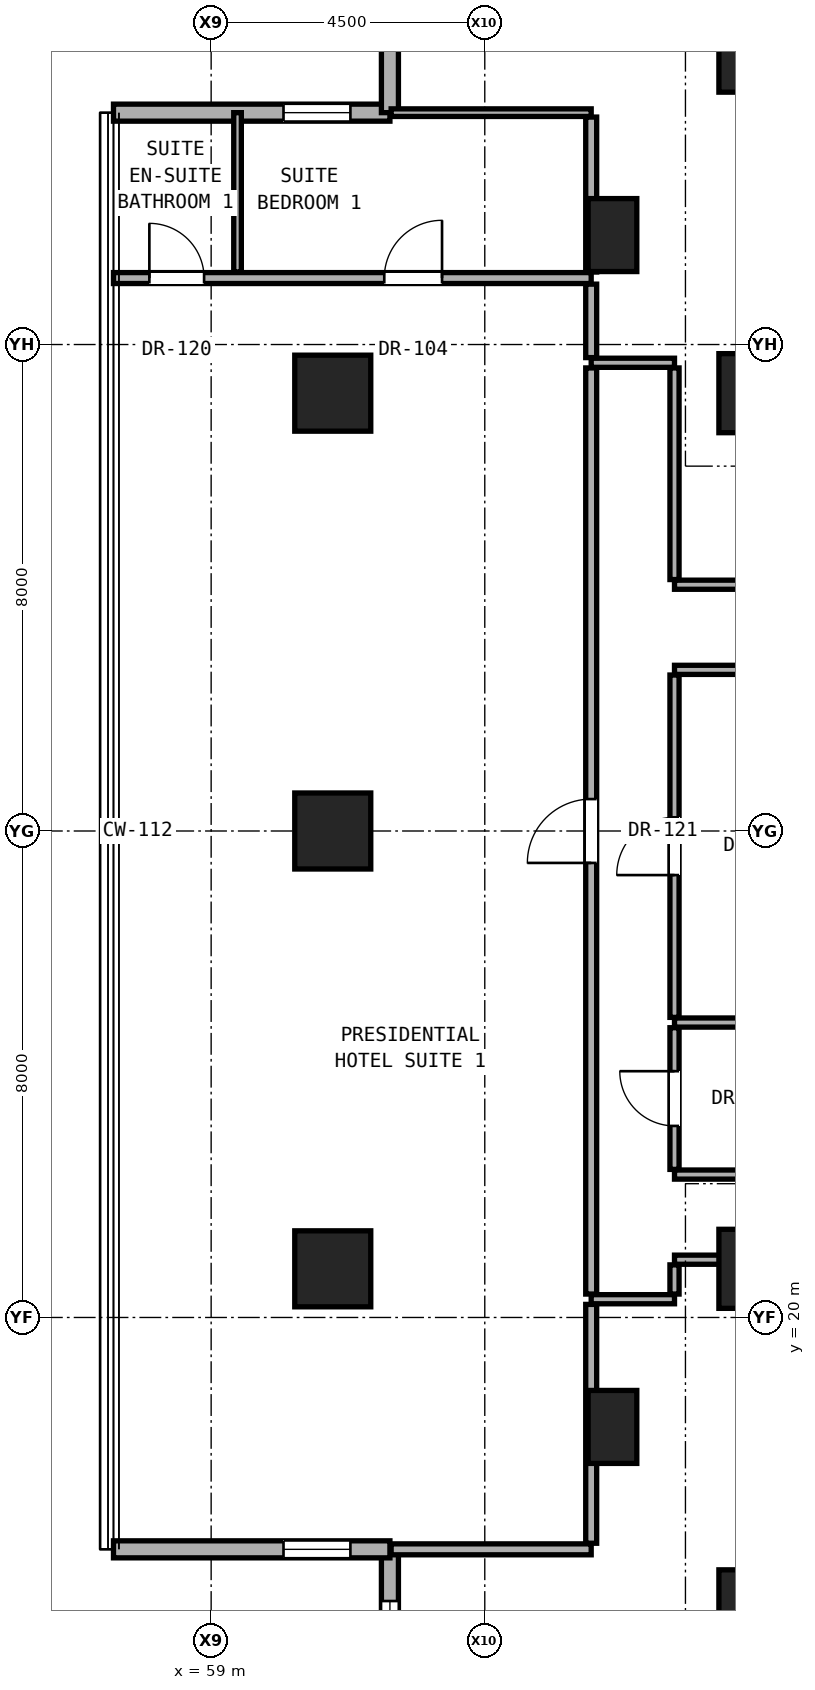
"""IFC4 building model, lengths in metres.
Left out: names, types, materials, properties, quantities, classifications, styles, units other than length and angle.
Written with IfcOpenShell. Run it as: python <this file> out.ifc"""

import sys

from ifc_helpers import new_model, si_unit, direction, frame, frame_2d, origin, origin_2d, place, context, subcontext, project, spatial, rectangle, hollow_rectangle, extrude, element, fill, save


model = new_model("IFC4")
c1 = context("Model", 3, precision=1e-05, world=origin(), true_north=direction((0.0, 1.0)))
c2 = subcontext(c1, "Body", "Model", "MODEL_VIEW")
j1 = project(units=[si_unit("LENGTHUNIT", "METRE"), si_unit("PLANEANGLEUNIT", "RADIAN")], contexts=[c1])
p1 = place(None, origin())
s1 = spatial("IfcSite", under=j1, at=p1, CompositionType="ELEMENT")
p2 = place(p1, origin())
s2 = spatial("IfcBuilding", under=s1, at=p2, CompositionType="ELEMENT")
p3 = place(p2, frame((0.0, 0.0, 75.2)))
s3 = spatial("IfcBuildingStorey", under=s2, at=p3, CompositionType="ELEMENT", Elevation=75.2)
for number, where, z_axis, x_axis in (
    (1, (68.0, 15.2, 0.0), (0.0, 0.0, 1.0), (1.0, 0.0, 0.0)),
    (2, (68.0, 20.8, 0.0), (0.0, 0.0, 1.0), (1.0, 0.0, 0.0)),
    (3, (68.0, 35.2, 0.0), (0.0, 0.0, 1.0), (1.0, 0.0, 0.0)),
    (4, (68.0, 40.8, 0.0), (0.0, 0.0, 1.0), (1.0, 0.0, 0.0)),
):
    element("IfcColumn", number, at=place(p3, frame(where, z_axis=z_axis, x_axis=x_axis)), inside=s3, PredefinedType="COLUMN", context=c2, shape_type="SweptSolid", body=[
        extrude(rectangle(XDim=1.3, YDim=1.3, at=origin_2d()), origin(), (0.0, 0.0, 1.0), 3.3),
    ])
for number, where, z_axis, x_axis in (
    (5, (61.0, 20.8, 0.0), (0.0, 0.0, 1.0), (1.0, 0.0, 0.0)),
    (6, (61.0, 28.0, 0.0), (0.0, 0.0, 1.0), (1.0, 0.0, 0.0)),
    (7, (61.0, 35.2, 0.0), (0.0, 0.0, 1.0), (1.0, 0.0, 0.0)),
):
    element("IfcColumn", number, at=place(p3, frame(where, z_axis=z_axis, x_axis=x_axis)), inside=s3, PredefinedType="COLUMN", context=c2, shape_type="SweptSolid", body=[
        extrude(hollow_rectangle(XDim=1.25, YDim=1.25, WallThickness=0.07, at=origin_2d()), origin(), (0.0, 0.0, 1.0), 3.3),
    ])
for number, where, z_axis, x_axis in (
    (8, (65.6, 18.2, 0.0), (0.0, 0.0, 1.0), (1.0, 0.0, 0.0)),
    (9, (65.6, 37.8, 0.0), (0.0, 0.0, 1.0), (1.0, 0.0, 0.0)),
):
    element("IfcColumn", number, at=place(p3, frame(where, z_axis=z_axis, x_axis=x_axis)), inside=s3, PredefinedType="PILASTER", context=c2, shape_type="SweptSolid", body=[
        extrude(rectangle(XDim=0.8, YDim=1.2, at=origin_2d()), origin(), (0.0, 0.0, 1.0), 3.3),
    ])
p4 = place(p3, frame((61.94, 16.187, 0.0), z_axis=(0.0, 0.0, 1.0), x_axis=(0.0, -1.0, 0.0)))
e10 = element("IfcWall", 10, at=p4, inside=s3, PredefinedType="SOLIDWALL", context=c2, shape_type="SweptSolid", body=[
    extrude(rectangle(XDim=4.546, YDim=0.28, at=frame_2d((2.273, 0.0))), origin(), (0.0, 0.0, 1.0), 3.04),
])
p5 = place(p4, frame((0.85, 0.0, 0.79)))
e11 = element("IfcOpeningElement", 11, at=p5, cuts=e10, PredefinedType="OPENING", context=c2, shape_type="SweptSolid", body=[
    extrude(rectangle(XDim=1.8, YDim=2.1, at=frame_2d((0.9, 1.05))), frame((0.0, 0.15, 0.0), z_axis=(0.0, -1.0, 0.0), x_axis=(1.0, 0.0, 0.0)), (0.0, 0.0, 1.0), 0.3),
])
p6 = place(p3, frame((57.394, 16.187, 0.0), z_axis=(0.0, 0.0, 1.0), x_axis=(1.0, 0.0, 0.0)))
e12 = element("IfcWall", 12, at=p6, inside=s3, PredefinedType="SOLIDWALL", context=c2, shape_type="SweptSolid", body=[
    extrude(rectangle(XDim=4.546, YDim=0.28, at=frame_2d((2.273, 0.0))), origin(), (0.0, 0.0, 1.0), 3.04),
])
p7 = place(p6, frame((2.796, 0.0, 0.85)))
e13 = element("IfcOpeningElement", 13, at=p7, cuts=e12, PredefinedType="OPENING", context=c2, shape_type="SweptSolid", body=[
    extrude(rectangle(XDim=1.1, YDim=2.0, at=frame_2d((0.55, 1.0))), frame((0.0, 0.15, 0.0), z_axis=(0.0, -1.0, 0.0), x_axis=(1.0, 0.0, 0.0)), (0.0, 0.0, 1.0), 0.3),
])
p8 = place(p3, frame((61.94, 39.813, 0.0), z_axis=(0.0, 0.0, 1.0), x_axis=(-1.0, 0.0, 0.0)))
e14 = element("IfcWall", 14, at=p8, inside=s3, PredefinedType="SOLIDWALL", context=c2, shape_type="SweptSolid", body=[
    extrude(rectangle(XDim=4.546, YDim=0.28, at=frame_2d((2.273, 0.0))), origin(), (0.0, 0.0, 1.0), 3.04),
])
p9 = place(p8, frame((0.65, 0.0, 0.85)))
e15 = element("IfcOpeningElement", 15, at=p9, cuts=e14, PredefinedType="OPENING", context=c2, shape_type="SweptSolid", body=[
    extrude(rectangle(XDim=1.1, YDim=2.0, at=frame_2d((0.55, 1.0))), frame((0.0, 0.15, 0.0), z_axis=(0.0, -1.0, 0.0), x_axis=(1.0, 0.0, 0.0)), (0.0, 0.0, 1.0), 0.3),
])
p10 = place(p3, frame((61.94, 44.359, 0.0), z_axis=(0.0, 0.0, 1.0), x_axis=(0.0, -1.0, 0.0)))
e16 = element("IfcWall", 16, at=p10, inside=s3, PredefinedType="SOLIDWALL", context=c2, shape_type="SweptSolid", body=[
    extrude(rectangle(XDim=4.546, YDim=0.28, at=frame_2d((2.273, 0.0))), origin(), (0.0, 0.0, 1.0), 3.04),
])
p11 = place(p3, frame((61.96, 16.187, 0.0), z_axis=(0.0, 0.0, 1.0), x_axis=(1.0, 0.0, 0.0)))
e17 = element("IfcWall", 17, at=p11, inside=s3, PredefinedType="PARTITIONING", context=c2, shape_type="SweptSolid", body=[
    extrude(rectangle(XDim=3.29, YDim=0.18, at=frame_2d((1.645, 0.0))), origin(), (0.0, 0.0, 1.0), 3.06),
])
p12 = place(p3, frame((65.25, 20.3, 0.0), z_axis=(0.0, 0.0, 1.0), x_axis=(1.0, 0.0, 0.0)))
e18 = element("IfcWall", 18, at=p12, inside=s3, PredefinedType="PARTITIONING", context=c2, shape_type="SweptSolid", body=[
    extrude(rectangle(XDim=1.37, YDim=0.15, at=frame_2d((0.685, 0.0))), origin(), (0.0, 0.0, 1.0), 3.06),
])
p13 = place(p3, frame((66.62, 20.95, 0.0), z_axis=(0.0, 0.0, 1.0), x_axis=(1.0, 0.0, 0.0)))
e19 = element("IfcWall", 19, at=p13, inside=s3, PredefinedType="PARTITIONING", context=c2, shape_type="SweptSolid", body=[
    extrude(rectangle(XDim=1.06, YDim=0.15, at=frame_2d((0.53, 0.0))), origin(), (0.0, 0.0, 1.0), 2.452),
])
p14 = place(p3, frame((66.62, 22.35, 0.0), z_axis=(0.0, 0.0, 1.0), x_axis=(1.0, 0.0, 0.0)))
e20 = element("IfcWall", 20, at=p14, inside=s3, PredefinedType="PARTITIONING", context=c2, shape_type="SweptSolid", body=[
    extrude(rectangle(XDim=19.63, YDim=0.15, at=frame_2d((9.815, 0.0))), origin(), (0.0, 0.0, 1.0), 2.125),
])
p15 = place(p14, frame((8.981, 0.0, 0.0)))
e21 = element("IfcOpeningElement", 21, at=p15, cuts=e20, PredefinedType="OPENING", context=c2, shape_type="SweptSolid", body=[
    extrude(rectangle(XDim=0.85, YDim=2.01, at=frame_2d((0.425, 1.005))), frame((0.0, 0.085, 0.0), z_axis=(0.0, -1.0, 0.0), x_axis=(1.0, 0.0, 0.0)), (0.0, 0.0, 1.0), 0.17),
])
p16 = place(p14, frame((16.061, 0.0, 0.0)))
e22 = element("IfcOpeningElement", 22, at=p16, cuts=e20, PredefinedType="OPENING", context=c2, shape_type="SweptSolid", body=[
    extrude(rectangle(XDim=0.85, YDim=2.01, at=frame_2d((0.425, 1.005))), frame((0.0, 0.085, 0.0), z_axis=(0.0, -1.0, 0.0), x_axis=(1.0, 0.0, 0.0)), (0.0, 0.0, 1.0), 0.17),
])
p17 = place(p3, frame((66.62, 24.85, 0.0), z_axis=(0.0, 0.0, 1.0), x_axis=(1.0, 0.0, 0.0)))
e23 = element("IfcWall", 23, at=p17, inside=s3, PredefinedType="PARTITIONING", context=c2, shape_type="SweptSolid", body=[
    extrude(rectangle(XDim=3.13, YDim=0.15, at=frame_2d((1.565, 0.0))), origin(), (0.0, 0.0, 1.0), 2.125),
])
p18 = place(p3, frame((66.62, 30.65, 0.0), z_axis=(0.0, 0.0, 1.0), x_axis=(1.0, 0.0, 0.0)))
e24 = element("IfcWall", 24, at=p18, inside=s3, PredefinedType="PARTITIONING", context=c2, shape_type="SweptSolid", body=[
    extrude(rectangle(XDim=19.63, YDim=0.15, at=frame_2d((9.815, 0.0))), origin(), (0.0, 0.0, 1.0), 2.125),
])
p19 = place(p18, frame((3.855, 0.0, 0.0)))
e25 = element("IfcOpeningElement", 25, at=p19, cuts=e24, PredefinedType="OPENING", context=c2, shape_type="SweptSolid", body=[
    extrude(rectangle(XDim=0.85, YDim=2.01, at=frame_2d((0.425, 1.005))), frame((0.0, 0.085, 0.0), z_axis=(0.0, -1.0, 0.0), x_axis=(1.0, 0.0, 0.0)), (0.0, 0.0, 1.0), 0.17),
])
p20 = place(p18, frame((8.981, 0.0, 0.0)))
e26 = element("IfcOpeningElement", 26, at=p20, cuts=e24, PredefinedType="OPENING", context=c2, shape_type="SweptSolid", body=[
    extrude(rectangle(XDim=0.85, YDim=2.01, at=frame_2d((0.425, 1.005))), frame((0.0, 0.085, 0.0), z_axis=(0.0, -1.0, 0.0), x_axis=(1.0, 0.0, 0.0)), (0.0, 0.0, 1.0), 0.17),
])
p21 = place(p18, frame((16.061, 0.0, 0.0)))
e27 = element("IfcOpeningElement", 27, at=p21, cuts=e24, PredefinedType="OPENING", context=c2, shape_type="SweptSolid", body=[
    extrude(rectangle(XDim=0.85, YDim=2.01, at=frame_2d((0.425, 1.005))), frame((0.0, 0.085, 0.0), z_axis=(0.0, -1.0, 0.0), x_axis=(1.0, 0.0, 0.0)), (0.0, 0.0, 1.0), 0.17),
])
p22 = place(p3, frame((66.62, 32.05, 0.0), z_axis=(0.0, 0.0, 1.0), x_axis=(1.0, 0.0, 0.0)))
e28 = element("IfcWall", 28, at=p22, inside=s3, PredefinedType="PARTITIONING", context=c2, shape_type="SweptSolid", body=[
    extrude(rectangle(XDim=2.18, YDim=0.15, at=frame_2d((1.09, 0.0))), origin(), (0.0, 0.0, 1.0), 2.125),
])
p23 = place(p3, frame((65.25, 35.7, 0.0), z_axis=(0.0, 0.0, 1.0), x_axis=(1.0, 0.0, 0.0)))
e29 = element("IfcWall", 29, at=p23, inside=s3, PredefinedType="PARTITIONING", context=c2, shape_type="SweptSolid", body=[
    extrude(rectangle(XDim=1.37, YDim=0.15, at=frame_2d((0.685, 0.0))), origin(), (0.0, 0.0, 1.0), 3.06),
])
p24 = place(p3, frame((57.394, 37.093, 0.0), z_axis=(0.0, 0.0, 1.0), x_axis=(1.0, 0.0, 0.0)))
e30 = element("IfcWall", 30, at=p24, inside=s3, PredefinedType="PARTITIONING", context=c2, shape_type="SweptSolid", body=[
    extrude(rectangle(XDim=7.856, YDim=0.18, at=frame_2d((3.928, 0.0))), origin(), (0.0, 0.0, 1.0), 2.436),
])
p25 = place(p24, frame((4.453, 0.0, 0.0)))
e31 = element("IfcOpeningElement", 31, at=p25, cuts=e30, PredefinedType="OPENING", context=c2, shape_type="SweptSolid", body=[
    extrude(rectangle(XDim=0.95, YDim=2.15, at=frame_2d((0.475, 1.075))), frame((0.0, 0.1, 0.0), z_axis=(0.0, -1.0, 0.0), x_axis=(1.0, 0.0, 0.0)), (0.0, 0.0, 1.0), 0.2),
])
p26 = place(p24, frame((0.59, 0.0, 0.0)))
e32 = element("IfcOpeningElement", 32, at=p26, cuts=e30, PredefinedType="OPENING", context=c2, shape_type="SweptSolid", body=[
    extrude(rectangle(XDim=0.9, YDim=2.1, at=frame_2d((0.45, 1.05))), frame((0.0, 0.1, 0.0), z_axis=(0.0, -1.0, 0.0), x_axis=(1.0, 0.0, 0.0)), (0.0, 0.0, 1.0), 0.2),
])
p27 = place(p3, frame((61.96, 39.813, 0.0), z_axis=(0.0, 0.0, 1.0), x_axis=(1.0, 0.0, 0.0)))
e33 = element("IfcWall", 33, at=p27, inside=s3, PredefinedType="PARTITIONING", context=c2, shape_type="SweptSolid", body=[
    extrude(rectangle(XDim=3.29, YDim=0.125, at=frame_2d((1.645, 0.0))), origin(), (0.0, 0.0, 1.0), 3.06),
])
p28 = place(p3, frame((59.434, 37.193, 0.0), z_axis=(0.0, 0.0, 1.0), x_axis=(0.0, 1.0, 0.0)))
e34 = element("IfcWall", 34, at=p28, inside=s3, PredefinedType="PARTITIONING", context=c2, shape_type="SweptSolid", body=[
    extrude(rectangle(XDim=2.62, YDim=0.125, at=frame_2d((1.31, 0.0))), origin(), (0.0, 0.0, 1.0), 3.06),
])
p29 = place(p3, frame((65.25, 16.287, 0.0), z_axis=(0.0, 0.0, 1.0), x_axis=(0.0, 1.0, 0.0)))
e35 = element("IfcWall", 35, at=p29, inside=s3, PredefinedType="PARTITIONING", context=c2, shape_type="SweptSolid", body=[
    extrude(rectangle(XDim=3.928, YDim=0.18, at=frame_2d((1.964, 0.0))), origin(), (0.0, 0.0, 1.0), 2.436),
])
p30 = place(p3, frame((65.25, 20.385, 0.0), z_axis=(0.0, 0.0, 1.0), x_axis=(0.0, 1.0, 0.0)))
e36 = element("IfcWall", 36, at=p30, inside=s3, PredefinedType="PARTITIONING", context=c2, shape_type="SweptSolid", body=[
    extrude(rectangle(XDim=15.23, YDim=0.18, at=frame_2d((7.615, 0.0))), origin(), (0.0, 0.0, 1.0), 2.279),
])
p31 = place(p30, frame((7.09, 0.0, 0.0)))
e37 = element("IfcOpeningElement", 37, at=p31, cuts=e36, PredefinedType="OPENING", context=c2, shape_type="SweptSolid", body=[
    extrude(rectangle(XDim=1.05, YDim=2.2, at=frame_2d((0.525, 1.1))), frame((0.0, 0.1, 0.0), z_axis=(0.0, -1.0, 0.0), x_axis=(1.0, 0.0, 0.0)), (0.0, 0.0, 1.0), 0.2),
])
p32 = place(p3, frame((65.25, 35.785, 0.0), z_axis=(0.0, 0.0, 1.0), x_axis=(0.0, 1.0, 0.0)))
e38 = element("IfcWall", 38, at=p32, inside=s3, PredefinedType="PARTITIONING", context=c2, shape_type="SweptSolid", body=[
    extrude(rectangle(XDim=1.208, YDim=0.18, at=frame_2d((0.604, 0.0))), origin(), (0.0, 0.0, 1.0), 3.06),
])
p33 = place(p3, frame((65.25, 37.193, 0.0), z_axis=(0.0, 0.0, 1.0), x_axis=(0.0, 1.0, 0.0)))
e39 = element("IfcWall", 39, at=p33, inside=s3, PredefinedType="PARTITIONING", context=c2, shape_type="SweptSolid", body=[
    extrude(rectangle(XDim=2.547, YDim=0.18, at=frame_2d((1.274, 0.0))), origin(), (0.0, 0.0, 1.0), 2.436),
])
p34 = place(p3, frame((66.62, 20.385, 0.0), z_axis=(0.0, 0.0, 1.0), x_axis=(0.0, 1.0, 0.0)))
e40 = element("IfcWall", 40, at=p34, inside=s3, PredefinedType="PARTITIONING", context=c2, shape_type="SweptSolid", body=[
    extrude(rectangle(XDim=0.48, YDim=0.15, at=frame_2d((0.24, 0.0))), origin(), (0.0, 0.0, 1.0), 2.452),
])
p35 = place(p3, frame((66.62, 22.435, 0.0), z_axis=(0.0, 0.0, 1.0), x_axis=(0.0, 1.0, 0.0)))
e41 = element("IfcWall", 41, at=p35, inside=s3, PredefinedType="PARTITIONING", context=c2, shape_type="SweptSolid", body=[
    extrude(rectangle(XDim=2.33, YDim=0.15, at=frame_2d((1.165, 0.0))), origin(), (0.0, 0.0, 1.0), 3.06),
])
p36 = place(p35, frame((0.715, 0.0, 0.0)))
e42 = element("IfcOpeningElement", 42, at=p36, cuts=e41, PredefinedType="OPENING", context=c2, shape_type="SweptSolid", body=[
    extrude(rectangle(XDim=0.9, YDim=2.1, at=frame_2d((0.45, 1.05))), frame((0.0, 0.085, 0.0), z_axis=(0.0, -1.0, 0.0), x_axis=(1.0, 0.0, 0.0)), (0.0, 0.0, 1.0), 0.17),
])
p37 = place(p3, frame((66.62, 24.935, 0.0), z_axis=(0.0, 0.0, 1.0), x_axis=(0.0, 1.0, 0.0)))
e43 = element("IfcWall", 43, at=p37, inside=s3, PredefinedType="PARTITIONING", context=c2, shape_type="SweptSolid", body=[
    extrude(rectangle(XDim=5.63, YDim=0.15, at=frame_2d((2.815, 0.0))), origin(), (0.0, 0.0, 1.0), 2.279),
])
p38 = place(p37, frame((2.34, 0.0, 0.0)))
e44 = element("IfcOpeningElement", 44, at=p38, cuts=e43, PredefinedType="OPENING", context=c2, shape_type="SweptSolid", body=[
    extrude(rectangle(XDim=0.95, YDim=2.15, at=frame_2d((0.475, 1.075))), frame((0.0, 0.085, 0.0), z_axis=(0.0, -1.0, 0.0), x_axis=(1.0, 0.0, 0.0)), (0.0, 0.0, 1.0), 0.17),
])
p39 = place(p3, frame((66.62, 32.135, 0.0), z_axis=(0.0, 0.0, 1.0), x_axis=(0.0, 1.0, 0.0)))
e45 = element("IfcWall", 45, at=p39, inside=s3, PredefinedType="PARTITIONING", context=c2, shape_type="SweptSolid", body=[
    extrude(rectangle(XDim=3.48, YDim=0.15, at=frame_2d((1.74, 0.0))), origin(), (0.0, 0.0, 1.0), 2.452),
])
p40 = place(p5, origin())
e46 = element("IfcWindow", 46, at=p40, inside=s3, PartitioningType="SINGLE_PANEL", PredefinedType="WINDOW", context=c2, shape_type="SweptSolid", body=[
    extrude(rectangle(XDim=1.8, YDim=2.1, at=frame_2d((0.9, 1.05))), frame((0.0, 0.03, 0.0), z_axis=(0.0, -1.0, 0.0), x_axis=(1.0, 0.0, 0.0)), (0.0, 0.0, 1.0), 0.06),
])
fill(e11, e46)
p41 = place(p7, origin())
e47 = element("IfcWindow", 47, at=p41, inside=s3, PartitioningType="SINGLE_PANEL", PredefinedType="WINDOW", context=c2, shape_type="SweptSolid", body=[
    extrude(rectangle(XDim=1.1, YDim=2.0, at=frame_2d((0.55, 1.0))), frame((0.0, 0.03, 0.0), z_axis=(0.0, -1.0, 0.0), x_axis=(1.0, 0.0, 0.0)), (0.0, 0.0, 1.0), 0.06),
])
fill(e13, e47)
p42 = place(p9, origin())
e48 = element("IfcWindow", 48, at=p42, inside=s3, PartitioningType="SINGLE_PANEL", PredefinedType="WINDOW", context=c2, shape_type="SweptSolid", body=[
    extrude(rectangle(XDim=1.1, YDim=2.0, at=frame_2d((0.55, 1.0))), frame((0.0, 0.03, 0.0), z_axis=(0.0, -1.0, 0.0), x_axis=(1.0, 0.0, 0.0)), (0.0, 0.0, 1.0), 0.06),
])
fill(e15, e48)
p43 = place(p36, origin())
e49 = element("IfcDoor", 49, at=p43, inside=s3, OperationType="SINGLE_SWING_RIGHT", PredefinedType="DOOR", context=c2, shape_type="SweptSolid", body=[
    extrude(rectangle(XDim=0.9, YDim=2.1, at=frame_2d((0.45, 1.05))), frame((0.0, 0.025, 0.0), z_axis=(0.0, -1.0, 0.0), x_axis=(1.0, 0.0, 0.0)), (0.0, 0.0, 1.0), 0.05),
])
fill(e42, e49)
p44 = place(p31, origin())
e50 = element("IfcDoor", 50, at=p44, inside=s3, OperationType="SINGLE_SWING_LEFT", PredefinedType="DOOR", context=c2, shape_type="SweptSolid", body=[
    extrude(rectangle(XDim=1.05, YDim=2.2, at=frame_2d((0.525, 1.1))), frame((0.0, 0.025, 0.0), z_axis=(0.0, -1.0, 0.0), x_axis=(1.0, 0.0, 0.0)), (0.0, 0.0, 1.0), 0.05),
])
fill(e37, e50)
p45 = place(p25, origin())
e51 = element("IfcDoor", 51, at=p45, inside=s3, OperationType="SINGLE_SWING_RIGHT", PredefinedType="DOOR", context=c2, shape_type="SweptSolid", body=[
    extrude(rectangle(XDim=0.95, YDim=2.15, at=frame_2d((0.475, 1.075))), frame((0.0, 0.025, 0.0), z_axis=(0.0, -1.0, 0.0), x_axis=(1.0, 0.0, 0.0)), (0.0, 0.0, 1.0), 0.05),
])
fill(e31, e51)
p46 = place(p26, origin())
e52 = element("IfcDoor", 52, at=p46, inside=s3, OperationType="SINGLE_SWING_LEFT", PredefinedType="DOOR", context=c2, shape_type="SweptSolid", body=[
    extrude(rectangle(XDim=0.9, YDim=2.1, at=frame_2d((0.45, 1.05))), frame((0.0, 0.025, 0.0), z_axis=(0.0, -1.0, 0.0), x_axis=(1.0, 0.0, 0.0)), (0.0, 0.0, 1.0), 0.05),
])
fill(e32, e52)
p47 = place(p38, origin())
e53 = element("IfcDoor", 53, at=p47, inside=s3, OperationType="SINGLE_SWING_LEFT", PredefinedType="DOOR", context=c2, shape_type="SweptSolid", body=[
    extrude(rectangle(XDim=0.95, YDim=2.15, at=frame_2d((0.475, 1.075))), frame((0.0, 0.025, 0.0), z_axis=(0.0, -1.0, 0.0), x_axis=(1.0, 0.0, 0.0)), (0.0, 0.0, 1.0), 0.05),
])
fill(e44, e53)
save(model, sys.argv[1])
